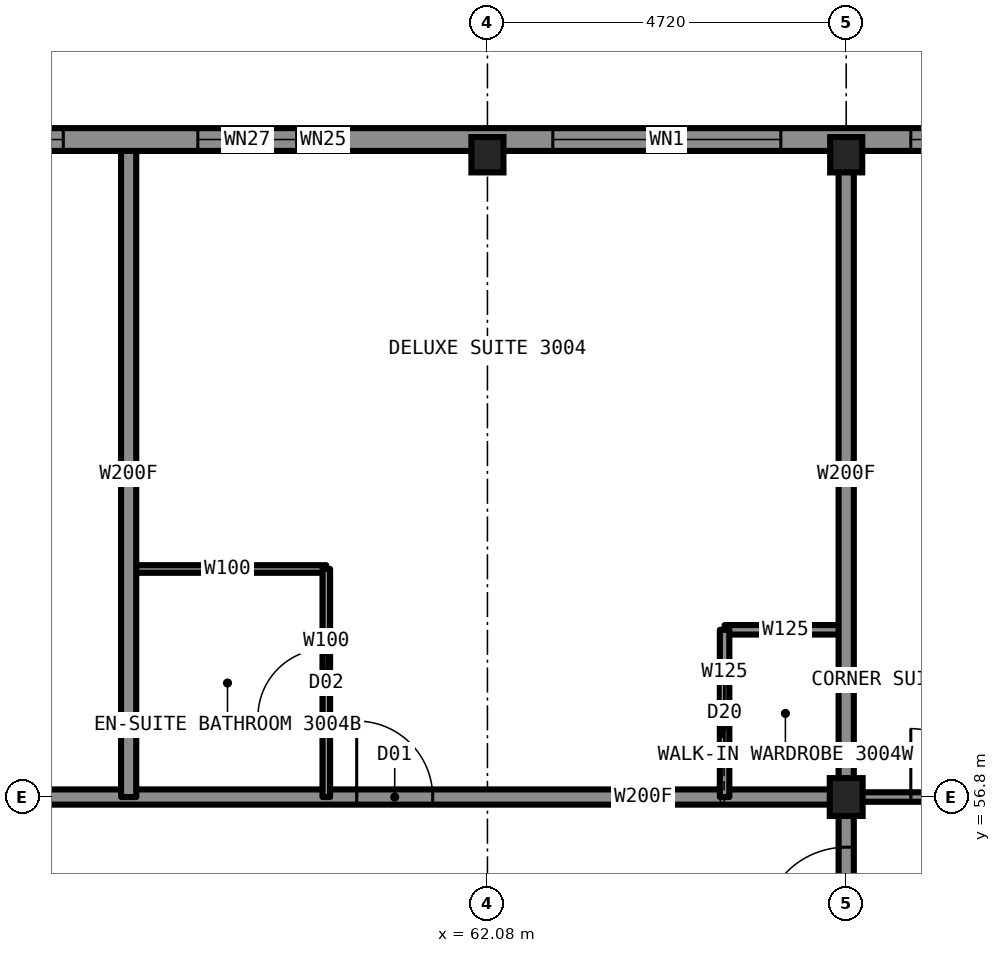
"""IFC4 building model, lengths in metres.
Left out: names, types, materials, properties, quantities, classifications, styles, units other than length and angle.
Written with IfcOpenShell. Run it as: python <this file> out.ifc"""

import sys

from ifc_helpers import new_model, si_unit, direction, frame, frame_2d, origin, origin_2d, place, context, subcontext, project, spatial, rectangle, i_section, extrude, element, fill, save


model = new_model("IFC4")
c1 = context("Model", 3, precision=1e-05, world=origin(), true_north=direction((0.0, 1.0)))
c2 = subcontext(c1, "Body", "Model", "MODEL_VIEW")
j1 = project(units=[si_unit("LENGTHUNIT", "METRE"), si_unit("PLANEANGLEUNIT", "RADIAN")], contexts=[c1])
p1 = place(None, origin())
s1 = spatial("IfcSite", under=j1, at=p1, CompositionType="ELEMENT")
p2 = place(p1, origin())
s2 = spatial("IfcBuilding", under=s1, at=p2, CompositionType="ELEMENT")
p3 = place(p2, frame((0.0, 0.0, 114.4)))
s3 = spatial("IfcBuildingStorey", under=s2, at=p3, CompositionType="ELEMENT", Elevation=114.4)
for number, where, z_axis, x_axis in (
    (1, (62.08, 65.25, 0.0), (0.0, 0.0, 1.0), (1.0, 0.0, 0.0)),
    (2, (66.8, 65.25, 0.0), (0.0, 0.0, 1.0), (1.0, 0.0, 0.0)),
):
    element("IfcColumn", number, at=place(p3, frame(where, z_axis=z_axis, x_axis=x_axis)), inside=s3, PredefinedType="COLUMN", context=c2, shape_type="SweptSolid", body=[
        extrude(i_section(OverallWidth=0.422, OverallDepth=0.465, WebThickness=0.045, FlangeThickness=0.073, at=origin_2d()), origin(), (0.0, 0.0, 1.0), 3.5),
    ])
p4 = place(p3, frame((66.8, 56.8, 0.0), z_axis=(0.0, 0.0, 1.0), x_axis=(1.0, 0.0, 0.0)))
e3 = element("IfcColumn", 3, at=p4, inside=s3, PredefinedType="COLUMN", context=c2, shape_type="SweptSolid", body=[
    extrude(i_section(OverallWidth=0.432, OverallDepth=0.498, WebThickness=0.056, FlangeThickness=0.089, at=origin_2d()), origin(), (0.0, 0.0, 1.0), 3.5),
])
p5 = place(p3, frame((43.2, 56.8, 0.0), z_axis=(0.0, 0.0, 1.0), x_axis=(1.0, 0.0, 0.0)))
e4 = element("IfcWall", 4, at=p5, inside=s3, PredefinedType="PARTITIONING", context=c2, shape_type="SweptSolid", body=[
    extrude(rectangle(XDim=23.6, YDim=0.2, at=frame_2d((11.8, 0.0))), origin(), (0.0, 0.0, 1.0), 3.33),
])
p6 = place(p5, frame((2.26, 0.0, 0.0)))
e5 = element("IfcOpeningElement", 5, at=p6, cuts=e4, PredefinedType="OPENING", context=c2, shape_type="SweptSolid", body=[
    extrude(rectangle(XDim=1.0, YDim=2.2, at=frame_2d((0.5, 1.1))), frame((0.0, 0.11, 0.0), z_axis=(0.0, -1.0, 0.0), x_axis=(1.0, 0.0, 0.0)), (0.0, 0.0, 1.0), 0.22),
])
p7 = place(p5, frame((6.18, 0.0, 0.0)))
e6 = element("IfcOpeningElement", 6, at=p7, cuts=e4, PredefinedType="OPENING", context=c2, shape_type="SweptSolid", body=[
    extrude(rectangle(XDim=1.0, YDim=2.2, at=frame_2d((0.5, 1.1))), frame((0.0, 0.11, 0.0), z_axis=(0.0, -1.0, 0.0), x_axis=(1.0, 0.0, 0.0)), (0.0, 0.0, 1.0), 0.22),
])
p8 = place(p5, frame((11.99, 0.0, 0.0)))
e7 = element("IfcOpeningElement", 7, at=p8, cuts=e4, PredefinedType="OPENING", context=c2, shape_type="SweptSolid", body=[
    extrude(rectangle(XDim=1.0, YDim=2.2, at=frame_2d((0.5, 1.1))), frame((0.0, 0.11, 0.0), z_axis=(0.0, -1.0, 0.0), x_axis=(1.0, 0.0, 0.0)), (0.0, 0.0, 1.0), 0.22),
])
p9 = place(p5, frame((17.16, 0.0, 0.0)))
e8 = element("IfcOpeningElement", 8, at=p9, cuts=e4, PredefinedType="OPENING", context=c2, shape_type="SweptSolid", body=[
    extrude(rectangle(XDim=1.0, YDim=2.2, at=frame_2d((0.5, 1.1))), frame((0.0, 0.11, 0.0), z_axis=(0.0, -1.0, 0.0), x_axis=(1.0, 0.0, 0.0)), (0.0, 0.0, 1.0), 0.22),
])
p10 = place(p3, frame((66.8, 56.8, 0.0), z_axis=(0.0, 0.0, 1.0), x_axis=(1.0, 0.0, 0.0)))
e9 = element("IfcWall", 9, at=p10, inside=s3, PredefinedType="PARTITIONING", context=c2, shape_type="SweptSolid", body=[
    extrude(rectangle(XDim=8.5, YDim=0.125, at=frame_2d((4.25, 0.0))), origin(), (0.0, 0.0, 1.0), 2.573),
])
p11 = place(p10, frame((0.85, 0.0, 0.0)))
e10 = element("IfcOpeningElement", 10, at=p11, cuts=e9, PredefinedType="OPENING", context=c2, shape_type="SweptSolid", body=[
    extrude(rectangle(XDim=0.9, YDim=2.2, at=frame_2d((0.45, 1.1))), frame((0.0, 0.073, 0.0), z_axis=(0.0, -1.0, 0.0), x_axis=(1.0, 0.0, 0.0)), (0.0, 0.0, 1.0), 0.145),
])
p12 = place(p3, frame((65.2, 59.0, 0.0), z_axis=(0.0, 0.0, 1.0), x_axis=(1.0, 0.0, 0.0)))
e11 = element("IfcWall", 11, at=p12, inside=s3, PredefinedType="PARTITIONING", context=c2, shape_type="SweptSolid", body=[
    extrude(rectangle(XDim=1.6, YDim=0.125, at=frame_2d((0.8, 0.0))), origin(), (0.0, 0.0, 1.0), 3.33),
])
p13 = place(p3, frame((57.36, 59.8, 0.0), z_axis=(0.0, 0.0, 1.0), x_axis=(1.0, 0.0, 0.0)))
e12 = element("IfcWall", 12, at=p13, inside=s3, PredefinedType="PARTITIONING", context=c2, shape_type="SweptSolid", body=[
    extrude(rectangle(XDim=2.6, YDim=0.1, at=frame_2d((1.3, 0.0))), origin(), (0.0, 0.0, 1.0), 3.33),
])
p14 = place(p3, frame((65.2, 56.8, 0.0), z_axis=(0.0, 0.0, 1.0), x_axis=(0.0, 1.0, 0.0)))
e13 = element("IfcWall", 13, at=p14, inside=s3, PredefinedType="PARTITIONING", context=c2, shape_type="SweptSolid", body=[
    extrude(rectangle(XDim=2.2, YDim=0.125, at=frame_2d((1.1, 0.0))), origin(), (0.0, 0.0, 1.0), 3.33),
])
p15 = place(p14, frame((0.7, 0.0, 0.0)))
e14 = element("IfcOpeningElement", 14, at=p15, cuts=e13, PredefinedType="OPENING", context=c2, shape_type="SweptSolid", body=[
    extrude(rectangle(XDim=0.8, YDim=2.1, at=frame_2d((0.4, 1.05))), frame((0.0, 0.073, 0.0), z_axis=(0.0, -1.0, 0.0), x_axis=(1.0, 0.0, 0.0)), (0.0, 0.0, 1.0), 0.145),
])
p16 = place(p3, frame((66.8, 52.08, 0.0), z_axis=(0.0, 0.0, 1.0), x_axis=(0.0, 1.0, 0.0)))
e15 = element("IfcWall", 15, at=p16, inside=s3, PredefinedType="PARTITIONING", context=c2, shape_type="SweptSolid", body=[
    extrude(rectangle(XDim=4.72, YDim=0.2, at=frame_2d((2.36, 0.0))), origin(), (0.0, 0.0, 1.0), 3.33),
])
p17 = place(p16, frame((2.96, 0.0, 0.0)))
e16 = element("IfcOpeningElement", 16, at=p17, cuts=e15, PredefinedType="OPENING", context=c2, shape_type="SweptSolid", body=[
    extrude(rectangle(XDim=1.1, YDim=2.2, at=frame_2d((0.55, 1.1))), frame((0.0, 0.11, 0.0), z_axis=(0.0, -1.0, 0.0), x_axis=(1.0, 0.0, 0.0)), (0.0, 0.0, 1.0), 0.22),
])
p18 = place(p3, frame((66.8, 56.8, 0.0), z_axis=(0.0, 0.0, 1.0), x_axis=(0.0, 1.0, 0.0)))
e17 = element("IfcWall", 17, at=p18, inside=s3, PredefinedType="PARTITIONING", context=c2, shape_type="SweptSolid", body=[
    extrude(rectangle(XDim=8.5, YDim=0.2, at=frame_2d((4.25, 0.0))), origin(), (0.0, 0.0, 1.0), 2.573),
])
p19 = place(p3, frame((57.36, 56.8, 0.0), z_axis=(0.0, 0.0, 1.0), x_axis=(0.0, 1.0, 0.0)))
e18 = element("IfcWall", 18, at=p19, inside=s3, PredefinedType="PARTITIONING", context=c2, shape_type="SweptSolid", body=[
    extrude(rectangle(XDim=8.5, YDim=0.2, at=frame_2d((4.25, 0.0))), origin(), (0.0, 0.0, 1.0), 3.33),
])
p20 = place(p3, frame((59.96, 56.8, 0.0), z_axis=(0.0, 0.0, 1.0), x_axis=(0.0, 1.0, 0.0)))
e19 = element("IfcWall", 19, at=p20, inside=s3, PredefinedType="PARTITIONING", context=c2, shape_type="SweptSolid", body=[
    extrude(rectangle(XDim=3.0, YDim=0.1, at=frame_2d((1.5, 0.0))), origin(), (0.0, 0.0, 1.0), 3.33),
])
p21 = place(p20, frame((1.05, 0.0, 0.0)))
e20 = element("IfcOpeningElement", 20, at=p21, cuts=e19, PredefinedType="OPENING", context=c2, shape_type="SweptSolid", body=[
    extrude(rectangle(XDim=0.9, YDim=2.1, at=frame_2d((0.45, 1.05))), frame((0.0, 0.06, 0.0), z_axis=(0.0, -1.0, 0.0), x_axis=(1.0, 0.0, 0.0)), (0.0, 0.0, 1.0), 0.12),
])
p22 = place(p3, frame((70.1, 65.45, 0.0), z_axis=(0.0, 0.0, 1.0), x_axis=(-1.0, 0.0, 0.0)))
e21 = element("IfcWall", 21, at=p22, inside=s3, PredefinedType="SOLIDWALL", context=c2, shape_type="SweptSolid", body=[
    extrude(rectangle(XDim=30.2, YDim=0.3, at=frame_2d((15.1, 0.0))), origin(), (0.0, 0.0, 1.0), 2.83),
])
p23 = place(p22, frame((0.85, 0.0, 0.5)))
e22 = element("IfcOpeningElement", 22, at=p23, cuts=e21, PredefinedType="OPENING", context=c2, shape_type="SweptSolid", body=[
    extrude(rectangle(XDim=1.6, YDim=2.0, at=frame_2d((0.8, 1.0))), frame((0.0, 0.16, 0.0), z_axis=(0.0, -1.0, 0.0), x_axis=(1.0, 0.0, 0.0)), (0.0, 0.0, 1.0), 0.32),
])
p24 = place(p22, frame((4.16, 0.0, 0.5)))
e23 = element("IfcOpeningElement", 23, at=p24, cuts=e21, PredefinedType="OPENING", context=c2, shape_type="SweptSolid", body=[
    extrude(rectangle(XDim=3.0, YDim=2.0, at=frame_2d((1.5, 1.0))), frame((0.0, 0.16, 0.0), z_axis=(0.0, -1.0, 0.0), x_axis=(1.0, 0.0, 0.0)), (0.0, 0.0, 1.0), 0.32),
])
p25 = place(p22, frame((10.53, 0.0, 0.5)))
e24 = element("IfcOpeningElement", 24, at=p25, cuts=e21, PredefinedType="OPENING", context=c2, shape_type="SweptSolid", body=[
    extrude(rectangle(XDim=1.3, YDim=1.9, at=frame_2d((0.65, 0.95))), frame((0.0, 0.16, 0.0), z_axis=(0.0, -1.0, 0.0), x_axis=(1.0, 0.0, 0.0)), (0.0, 0.0, 1.0), 0.32),
])
p26 = place(p22, frame((13.6, 0.0, 0.5)))
e25 = element("IfcOpeningElement", 25, at=p26, cuts=e21, PredefinedType="OPENING", context=c2, shape_type="SweptSolid", body=[
    extrude(rectangle(XDim=3.0, YDim=2.0, at=frame_2d((1.5, 1.0))), frame((0.0, 0.16, 0.0), z_axis=(0.0, -1.0, 0.0), x_axis=(1.0, 0.0, 0.0)), (0.0, 0.0, 1.0), 0.32),
])
p27 = place(p22, frame((18.32, 0.0, 0.5)))
e26 = element("IfcOpeningElement", 26, at=p27, cuts=e21, PredefinedType="OPENING", context=c2, shape_type="SweptSolid", body=[
    extrude(rectangle(XDim=1.3, YDim=1.9, at=frame_2d((0.65, 0.95))), frame((0.0, 0.16, 0.0), z_axis=(0.0, -1.0, 0.0), x_axis=(1.0, 0.0, 0.0)), (0.0, 0.0, 1.0), 0.32),
])
p28 = place(p22, frame((23.04, 0.0, 0.5)))
e27 = element("IfcOpeningElement", 27, at=p28, cuts=e21, PredefinedType="OPENING", context=c2, shape_type="SweptSolid", body=[
    extrude(rectangle(XDim=3.0, YDim=2.0, at=frame_2d((1.5, 1.0))), frame((0.0, 0.16, 0.0), z_axis=(0.0, -1.0, 0.0), x_axis=(1.0, 0.0, 0.0)), (0.0, 0.0, 1.0), 0.32),
])
p29 = place(p22, frame((27.75, 0.0, 0.5)))
e28 = element("IfcOpeningElement", 28, at=p29, cuts=e21, PredefinedType="OPENING", context=c2, shape_type="SweptSolid", body=[
    extrude(rectangle(XDim=1.6, YDim=2.0, at=frame_2d((0.8, 1.0))), frame((0.0, 0.16, 0.0), z_axis=(0.0, -1.0, 0.0), x_axis=(1.0, 0.0, 0.0)), (0.0, 0.0, 1.0), 0.32),
])
p30 = place(p22, frame((9.88, 0.0, 0.5)))
e29 = element("IfcOpeningElement", 29, at=p30, cuts=e21, PredefinedType="OPENING", context=c2, shape_type="SweptSolid", body=[
    extrude(rectangle(XDim=0.6, YDim=0.9, at=frame_2d((0.3, 0.45))), frame((0.0, 0.16, 0.0), z_axis=(0.0, -1.0, 0.0), x_axis=(1.0, 0.0, 0.0)), (0.0, 0.0, 1.0), 0.32),
])
p31 = place(p22, frame((19.67, 0.0, 0.5)))
e30 = element("IfcOpeningElement", 30, at=p31, cuts=e21, PredefinedType="OPENING", context=c2, shape_type="SweptSolid", body=[
    extrude(rectangle(XDim=0.6, YDim=0.9, at=frame_2d((0.3, 0.45))), frame((0.0, 0.16, 0.0), z_axis=(0.0, -1.0, 0.0), x_axis=(1.0, 0.0, 0.0)), (0.0, 0.0, 1.0), 0.32),
])
p32 = place(p9, origin())
e31 = element("IfcDoor", 31, at=p32, inside=s3, OperationType="SINGLE_SWING_LEFT", PredefinedType="DOOR", context=c2, shape_type="SweptSolid", body=[
    extrude(rectangle(XDim=1.0, YDim=2.2, at=frame_2d((0.5, 1.1))), frame((0.0, 0.025, 0.0), z_axis=(0.0, -1.0, 0.0), x_axis=(1.0, 0.0, 0.0)), (0.0, 0.0, 1.0), 0.05),
])
fill(e8, e31)
p33 = place(p21, origin())
e32 = element("IfcDoor", 32, at=p33, inside=s3, OperationType="SINGLE_SWING_RIGHT", PredefinedType="DOOR", context=c2, shape_type="SweptSolid", body=[
    extrude(rectangle(XDim=0.9, YDim=2.1, at=frame_2d((0.45, 1.05))), frame((0.0, 0.025, 0.0), z_axis=(0.0, -1.0, 0.0), x_axis=(1.0, 0.0, 0.0)), (0.0, 0.0, 1.0), 0.05),
])
fill(e20, e32)
p34 = place(p15, origin())
e33 = element("IfcDoor", 33, at=p34, inside=s3, OperationType="SLIDING_TO_LEFT", PredefinedType="DOOR", context=c2, shape_type="SweptSolid", body=[
    extrude(rectangle(XDim=0.8, YDim=2.1, at=frame_2d((0.4, 1.05))), frame((0.0, 0.025, 0.0), z_axis=(0.0, -1.0, 0.0), x_axis=(1.0, 0.0, 0.0)), (0.0, 0.0, 1.0), 0.05),
])
fill(e14, e33)
p35 = place(p11, origin())
e34 = element("IfcDoor", 34, at=p35, inside=s3, OperationType="SINGLE_SWING_LEFT", PredefinedType="DOOR", context=c2, shape_type="SweptSolid", body=[
    extrude(rectangle(XDim=0.9, YDim=2.2, at=frame_2d((0.45, 1.1))), frame((0.0, 0.025, 0.0), z_axis=(0.0, -1.0, 0.0), x_axis=(1.0, 0.0, 0.0)), (0.0, 0.0, 1.0), 0.05),
])
fill(e10, e34)
p36 = place(p17, origin())
e35 = element("IfcDoor", 35, at=p36, inside=s3, OperationType="SINGLE_SWING_LEFT", PredefinedType="DOOR", context=c2, shape_type="SweptSolid", body=[
    extrude(rectangle(XDim=1.1, YDim=2.2, at=frame_2d((0.55, 1.1))), frame((0.0, 0.025, 0.0), z_axis=(0.0, -1.0, 0.0), x_axis=(1.0, 0.0, 0.0)), (0.0, 0.0, 1.0), 0.05),
])
fill(e16, e35)
p37 = place(p23, origin())
e36 = element("IfcWindow", 36, at=p37, inside=s3, PartitioningType="SINGLE_PANEL", PredefinedType="WINDOW", context=c2, shape_type="SweptSolid", body=[
    extrude(rectangle(XDim=1.6, YDim=2.0, at=frame_2d((0.8, 1.0))), frame((0.0, 0.03, 0.0), z_axis=(0.0, -1.0, 0.0), x_axis=(1.0, 0.0, 0.0)), (0.0, 0.0, 1.0), 0.06),
])
fill(e22, e36)
p38 = place(p24, origin())
e37 = element("IfcWindow", 37, at=p38, inside=s3, PartitioningType="SINGLE_PANEL", PredefinedType="WINDOW", context=c2, shape_type="SweptSolid", body=[
    extrude(rectangle(XDim=3.0, YDim=2.0, at=frame_2d((1.5, 1.0))), frame((0.0, 0.03, 0.0), z_axis=(0.0, -1.0, 0.0), x_axis=(1.0, 0.0, 0.0)), (0.0, 0.0, 1.0), 0.06),
])
fill(e23, e37)
p39 = place(p25, origin())
e38 = element("IfcWindow", 38, at=p39, inside=s3, PartitioningType="SINGLE_PANEL", PredefinedType="WINDOW", context=c2, shape_type="SweptSolid", body=[
    extrude(rectangle(XDim=1.3, YDim=1.9, at=frame_2d((0.65, 0.95))), frame((0.0, 0.03, 0.0), z_axis=(0.0, -1.0, 0.0), x_axis=(1.0, 0.0, 0.0)), (0.0, 0.0, 1.0), 0.06),
])
fill(e24, e38)
p40 = place(p26, origin())
e39 = element("IfcWindow", 39, at=p40, inside=s3, PartitioningType="SINGLE_PANEL", PredefinedType="WINDOW", context=c2, shape_type="SweptSolid", body=[
    extrude(rectangle(XDim=3.0, YDim=2.0, at=frame_2d((1.5, 1.0))), frame((0.0, 0.03, 0.0), z_axis=(0.0, -1.0, 0.0), x_axis=(1.0, 0.0, 0.0)), (0.0, 0.0, 1.0), 0.06),
])
fill(e25, e39)
p41 = place(p30, origin())
e40 = element("IfcWindow", 40, at=p41, inside=s3, PartitioningType="SINGLE_PANEL", PredefinedType="WINDOW", context=c2, shape_type="SweptSolid", body=[
    extrude(rectangle(XDim=0.6, YDim=0.9, at=frame_2d((0.3, 0.45))), frame((0.0, 0.03, 0.0), z_axis=(0.0, -1.0, 0.0), x_axis=(1.0, 0.0, 0.0)), (0.0, 0.0, 1.0), 0.06),
])
fill(e29, e40)
save(model, sys.argv[1])
